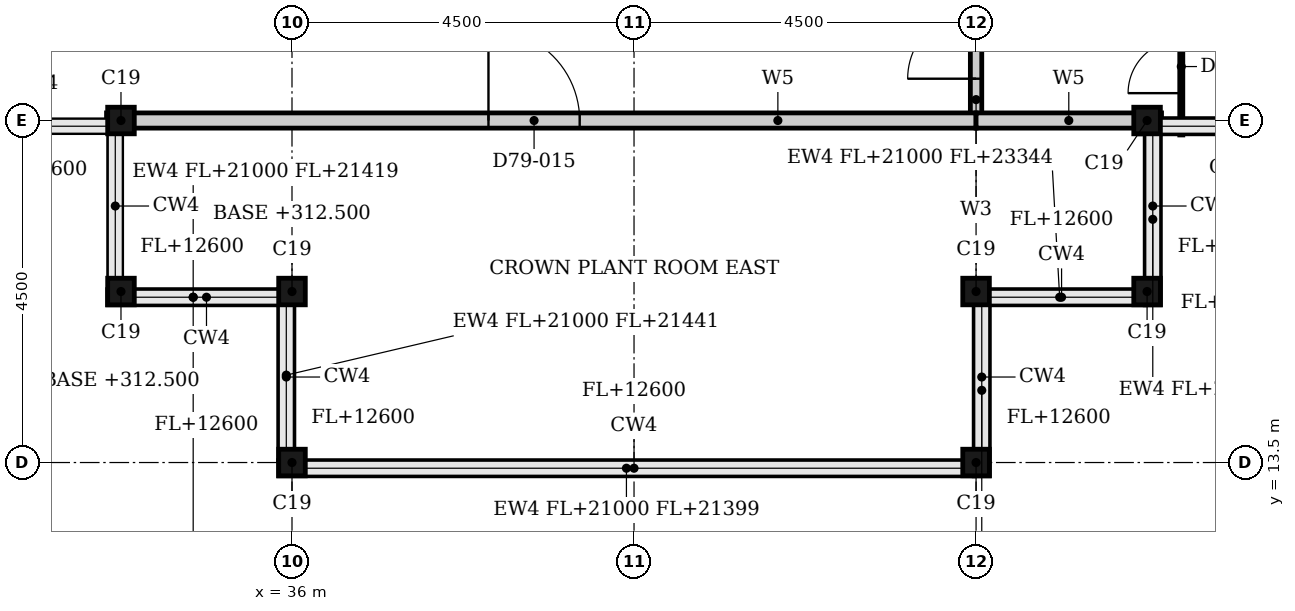
"""IFC4 building model, lengths in metres.
Left out: names, types, materials, properties, quantities, classifications, styles, units other than length and angle.
Written with IfcOpenShell. Run it as: python <this file> out.ifc"""

import sys

from ifc_helpers import new_model, si_unit, direction, frame, frame_2d, origin, origin_2d, place, context, subcontext, project, spatial, polyline, rectangle, i_section, outline, extrude, element, fill, save


model = new_model("IFC4")
c1 = context("Model", 3, precision=1e-05, world=origin(), true_north=direction((0.0, 1.0)))
c2 = subcontext(c1, "Body", "Model", "MODEL_VIEW")
j1 = project(units=[si_unit("LENGTHUNIT", "METRE"), si_unit("PLANEANGLEUNIT", "RADIAN")], contexts=[c1])
p1 = place(None, origin())
s1 = spatial("IfcSite", under=j1, at=p1, CompositionType="ELEMENT")
p2 = place(p1, origin())
s2 = spatial("IfcBuilding", under=s1, at=p2, CompositionType="ELEMENT")
p3 = place(p2, frame((0.0, 0.0, 312.8)))
s3 = spatial("IfcBuildingStorey", under=s2, at=p3, CompositionType="ELEMENT", Elevation=312.8)
for number, where, z_axis, x_axis in (
    (1, (45.0, 13.5, 0.0), (0.0, 0.0, 1.0), (1.0, 0.0, 0.0)),
    (2, (45.0, 15.75, 0.0), (0.0, 0.0, 1.0), (1.0, 0.0, 0.0)),
    (3, (47.25, 15.75, 0.0), (0.0, 0.0, 1.0), (1.0, 0.0, 0.0)),
    (4, (47.25, 18.0, 0.0), (0.0, 0.0, 1.0), (1.0, 0.0, 0.0)),
):
    element("IfcColumn", number, at=place(p3, frame(where, z_axis=z_axis, x_axis=x_axis)), inside=s3, PredefinedType="COLUMN", context=c2, shape_type="SweptSolid", body=[
        extrude(i_section(OverallWidth=0.35, OverallDepth=0.35, WebThickness=0.012, FlangeThickness=0.019, FilletRadius=0.013, at=origin_2d()), origin(), (0.0, 0.0, 1.0), 4.2),
    ])
for number, where, z_axis, x_axis in (
    (5, (33.75, 18.0, -0.3), (0.0, 0.0, 1.0), (1.0, 0.0, 0.0)),
    (6, (33.75, 15.75, -0.3), (0.0, 0.0, 1.0), (1.0, 0.0, 0.0)),
    (7, (36.0, 15.75, -0.3), (0.0, 0.0, 1.0), (1.0, 0.0, 0.0)),
):
    element("IfcColumn", number, at=place(p3, frame(where, z_axis=z_axis, x_axis=x_axis)), inside=s3, PredefinedType="COLUMN", context=c2, shape_type="SweptSolid", body=[
        extrude(i_section(OverallWidth=0.35, OverallDepth=0.35, WebThickness=0.012, FlangeThickness=0.019, FilletRadius=0.013, at=origin_2d()), origin(), (0.0, 0.0, 1.0), 4.5),
    ])
p4 = place(p3, frame((36.0, 13.5, 0.0), z_axis=(0.0, 0.0, 1.0), x_axis=(1.0, 0.0, 0.0)))
e8 = element("IfcColumn", 8, at=p4, inside=s3, PredefinedType="COLUMN", context=c2, shape_type="SweptSolid", body=[
    extrude(i_section(OverallWidth=0.35, OverallDepth=0.35, WebThickness=0.012, FlangeThickness=0.019, FilletRadius=0.013, at=origin_2d()), origin(), (0.0, 0.0, 1.0), 4.2),
])
p5 = place(p3, frame((45.075, 13.325, 21.0), z_axis=(0.0, 0.0, 1.0), x_axis=(0.0, 1.0, 0.0)))
e9 = element("IfcWall", 9, at=p5, inside=s3, PredefinedType="SOLIDWALL", context=c2, shape_type="SweptSolid", body=[
    extrude(rectangle(XDim=2.25, YDim=0.2, at=frame_2d((1.125, 0.0))), origin(), (0.0, 0.0, 1.0), 2.385),
])
p6 = place(p3, frame((44.975, 15.675, 21.0), z_axis=(0.0, 0.0, 1.0), x_axis=(1.0, 0.0, 0.0)))
e10 = element("IfcWall", 10, at=p6, inside=s3, PredefinedType="SOLIDWALL", context=c2, shape_type="SweptSolid", body=[
    extrude(rectangle(XDim=2.25, YDim=0.2, at=frame_2d((1.125, 0.0))), origin(), (0.0, 0.0, 1.0), 2.344),
])
p7 = place(p3, frame((47.325, 15.575, 21.0), z_axis=(0.0, 0.0, 1.0), x_axis=(0.0, 1.0, 0.0)))
e11 = element("IfcWall", 11, at=p7, inside=s3, PredefinedType="SOLIDWALL", context=c2, shape_type="SweptSolid", body=[
    extrude(rectangle(XDim=2.25, YDim=0.2, at=frame_2d((1.125, 0.0))), origin(), (0.0, 0.0, 1.0), 2.864),
])
p8 = place(p3, frame((47.15, 17.925, 21.0), z_axis=(0.0, 0.0, 1.0), x_axis=(1.0, 0.0, 0.0)))
e12 = element("IfcWall", 12, at=p8, inside=s3, PredefinedType="SOLIDWALL", context=c2, shape_type="SweptSolid", body=[
    extrude(rectangle(XDim=2.325, YDim=0.2, at=frame_2d((1.163, 0.0))), origin(), (0.0, 0.0, 1.0), 2.806),
])
p9 = place(p3, frame((33.575, 15.675, 21.0), z_axis=(0.0, 0.0, 1.0), x_axis=(1.0, 0.0, 0.0)))
e13 = element("IfcWall", 13, at=p9, inside=s3, PredefinedType="SOLIDWALL", context=c2, shape_type="SweptSolid", body=[
    extrude(outline(polyline([(0.0, 0.0), (2.25, 0.0), (2.25, 0.419), (0.0, 0.0)])), frame((0.0, 0.1, 0.0), z_axis=(0.0, -1.0, 0.0), x_axis=(1.0, 0.0, 0.0)), (0.0, 0.0, 1.0), 0.2),
])
p10 = place(p3, frame((35.925, 15.775, 21.0), z_axis=(0.0, 0.0, 1.0), x_axis=(0.0, -1.0, 0.0)))
e14 = element("IfcWall", 14, at=p10, inside=s3, PredefinedType="SOLIDWALL", context=c2, shape_type="SweptSolid", body=[
    extrude(rectangle(XDim=2.25, YDim=0.2, at=frame_2d((1.125, 0.0))), origin(), (0.0, 0.0, 1.0), 0.44),
])
p11 = place(p3, frame((35.825, 13.425, 21.0), z_axis=(0.0, 0.0, 1.0), x_axis=(1.0, 0.0, 0.0)))
e15 = element("IfcWall", 15, at=p11, inside=s3, PredefinedType="SOLIDWALL", context=c2, shape_type="SweptSolid", body=[
    extrude(rectangle(XDim=9.15, YDim=0.2, at=frame_2d((4.575, 0.0))), origin(), (0.0, 0.0, 1.0), 0.399),
])
p12 = place(p3, frame((45.0, 18.0, 0.0), z_axis=(0.0, 0.0, 1.0), x_axis=(0.0, 1.0, 0.0)))
e16 = element("IfcWall", 16, at=p12, inside=s3, PredefinedType="PARTITIONING", context=c2, shape_type="SweptSolid", body=[
    extrude(rectangle(XDim=2.0, YDim=0.15, at=frame_2d((1.0, 0.0))), origin(), (0.0, 0.0, 1.0), 3.9),
])
p13 = place(p12, frame((0.55, 0.0, 0.0)))
e17 = element("IfcOpeningElement", 17, at=p13, cuts=e16, PredefinedType="OPENING", context=c2, shape_type="SweptSolid", body=[
    extrude(rectangle(XDim=0.9, YDim=2.1, at=frame_2d((0.45, 1.05))), frame((0.0, 0.085, 0.0), z_axis=(0.0, -1.0, 0.0), x_axis=(1.0, 0.0, 0.0)), (0.0, 0.0, 1.0), 0.17),
])
p14 = place(p3, frame((33.56, 18.0, 0.0), z_axis=(0.0, 0.0, 1.0), x_axis=(1.0, 0.0, 0.0)))
e18 = element("IfcWall", 18, at=p14, inside=s3, PredefinedType="PARTITIONING", context=c2, shape_type="SweptSolid", body=[
    extrude(rectangle(XDim=11.44, YDim=0.2, at=frame_2d((5.72, 0.0))), origin(), (0.0, 0.0, 1.0), 3.08),
])
p15 = place(p14, frame((5.025, 0.0, 0.0)))
e19 = element("IfcOpeningElement", 19, at=p15, cuts=e18, PredefinedType="OPENING", context=c2, shape_type="SweptSolid", body=[
    extrude(rectangle(XDim=1.2, YDim=2.1, at=frame_2d((0.6, 1.05))), frame((0.0, 0.11, 0.0), z_axis=(0.0, -1.0, 0.0), x_axis=(1.0, 0.0, 0.0)), (0.0, 0.0, 1.0), 0.22),
])
p16 = place(p3, frame((45.0, 18.0, 0.0), z_axis=(0.0, 0.0, 1.0), x_axis=(1.0, 0.0, 0.0)))
e20 = element("IfcWall", 20, at=p16, inside=s3, PredefinedType="PARTITIONING", context=c2, shape_type="SweptSolid", body=[
    extrude(rectangle(XDim=2.44, YDim=0.2, at=frame_2d((1.22, 0.0))), origin(), (0.0, 0.0, 1.0), 3.08),
])
p17 = place(p3, frame((47.7, 17.81, 0.0), z_axis=(0.0, 0.0, 1.0), x_axis=(0.0, 1.0, 0.0)))
e21 = element("IfcWall", 21, at=p17, inside=s3, PredefinedType="PARTITIONING", context=c2, shape_type="SweptSolid", body=[
    extrude(rectangle(XDim=4.69, YDim=0.04, at=frame_2d((2.345, 0.0))), origin(), (0.0, 0.0, 1.0), 3.9),
])
p18 = place(p17, frame((0.55, 0.0, 0.0)))
e22 = element("IfcOpeningElement", 22, at=p18, cuts=e21, PredefinedType="OPENING", context=c2, shape_type="SweptSolid", body=[
    extrude(rectangle(XDim=0.7, YDim=2.0, at=frame_2d((0.35, 1.0))), frame((0.0, 0.03, 0.0), z_axis=(0.0, -1.0, 0.0), x_axis=(1.0, 0.0, 0.0)), (0.0, 0.0, 1.0), 0.06),
])
p19 = place(p17, frame((1.9, 0.0, 0.0)))
e23 = element("IfcOpeningElement", 23, at=p19, cuts=e21, PredefinedType="OPENING", context=c2, shape_type="SweptSolid", body=[
    extrude(rectangle(XDim=0.7, YDim=2.0, at=frame_2d((0.35, 1.0))), frame((0.0, 0.03, 0.0), z_axis=(0.0, -1.0, 0.0), x_axis=(1.0, 0.0, 0.0)), (0.0, 0.0, 1.0), 0.06),
])
p20 = place(p17, frame((3.3, 0.0, 0.0)))
e24 = element("IfcOpeningElement", 24, at=p20, cuts=e21, PredefinedType="OPENING", context=c2, shape_type="SweptSolid", body=[
    extrude(rectangle(XDim=0.9, YDim=2.0, at=frame_2d((0.45, 1.0))), frame((0.0, 0.03, 0.0), z_axis=(0.0, -1.0, 0.0), x_axis=(1.0, 0.0, 0.0)), (0.0, 0.0, 1.0), 0.06),
])
p21 = place(p15, origin())
e25 = element("IfcDoor", 25, at=p21, inside=s3, OperationType="SINGLE_SWING_LEFT", PredefinedType="DOOR", context=c2, shape_type="SweptSolid", body=[
    extrude(rectangle(XDim=1.2, YDim=2.1, at=frame_2d((0.6, 1.05))), frame((0.0, 0.025, 0.0), z_axis=(0.0, -1.0, 0.0), x_axis=(1.0, 0.0, 0.0)), (0.0, 0.0, 1.0), 0.05),
])
fill(e19, e25)
p22 = place(p13, origin())
e26 = element("IfcDoor", 26, at=p22, inside=s3, OperationType="SINGLE_SWING_RIGHT", PredefinedType="DOOR", context=c2, shape_type="SweptSolid", body=[
    extrude(rectangle(XDim=0.9, YDim=2.1, at=frame_2d((0.45, 1.05))), frame((0.0, 0.025, 0.0), z_axis=(0.0, -1.0, 0.0), x_axis=(1.0, 0.0, 0.0)), (0.0, 0.0, 1.0), 0.05),
])
fill(e17, e26)
p23 = place(p18, origin())
e27 = element("IfcDoor", 27, at=p23, inside=s3, OperationType="SINGLE_SWING_LEFT", PredefinedType="DOOR", context=c2, shape_type="SweptSolid", body=[
    extrude(rectangle(XDim=0.7, YDim=2.0, at=frame_2d((0.35, 1.0))), frame((0.0, 0.02, 0.0), z_axis=(0.0, -1.0, 0.0), x_axis=(1.0, 0.0, 0.0)), (0.0, 0.0, 1.0), 0.04),
])
fill(e22, e27)
save(model, sys.argv[1])
